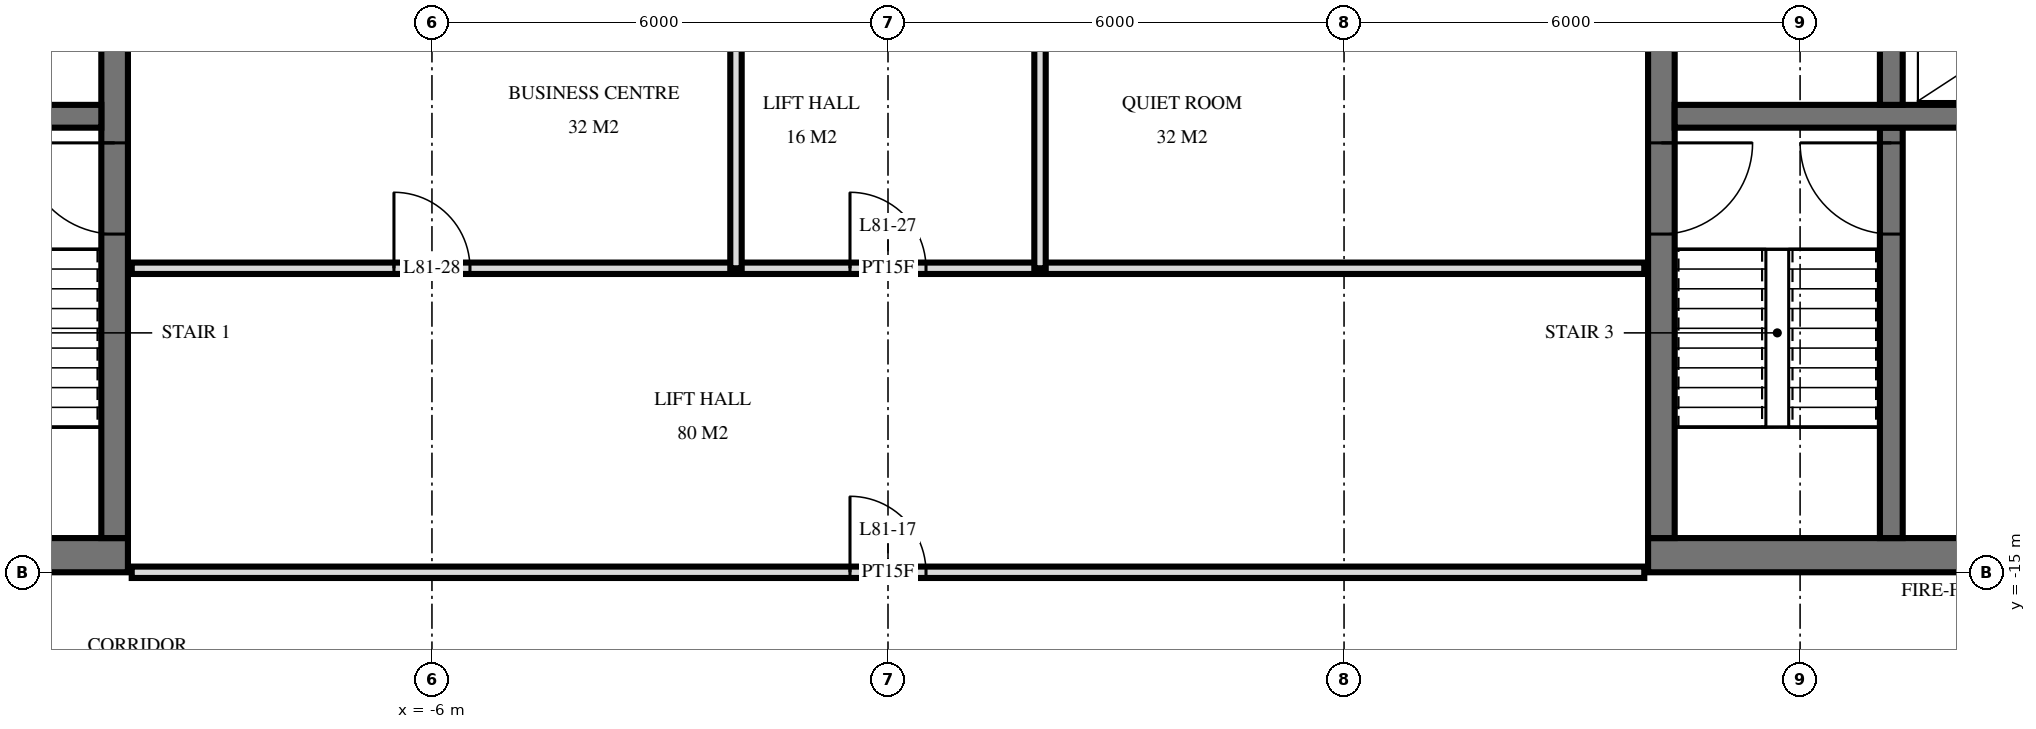
"""IFC4 building model, lengths in metres.
Left out: names, types, materials, properties, quantities, classifications, styles, units other than length and angle.
Written with IfcOpenShell. Run it as: python <this file> out.ifc"""

import sys

from ifc_helpers import new_model, si_unit, direction, frame, frame_2d, origin, place, context, subcontext, project, spatial, rectangle, extrude, element, fill, save


model = new_model("IFC4")
c1 = context("Model", 3, precision=1e-05, world=origin(), true_north=direction((0.0, 1.0)))
c2 = subcontext(c1, "Body", "Model", "MODEL_VIEW")
j1 = project(units=[si_unit("LENGTHUNIT", "METRE"), si_unit("PLANEANGLEUNIT", "RADIAN")], contexts=[c1])
p1 = place(None, origin())
s1 = spatial("IfcSite", under=j1, at=p1, CompositionType="ELEMENT")
p2 = place(p1, origin())
s2 = spatial("IfcBuilding", under=s1, at=p2, CompositionType="ELEMENT")
p3 = place(p2, frame((0.0, 0.0, 305.1)))
s3 = spatial("IfcBuildingStorey", under=s2, at=p3, CompositionType="ELEMENT", Elevation=305.1)
p4 = place(p3, frame((-19.5, -14.775, 0.0), z_axis=(0.0, 0.0, 1.0), x_axis=(1.0, 0.0, 0.0)))
e1 = element("IfcWall", 1, at=p4, inside=s3, PredefinedType="SHEAR", context=c2, shape_type="SweptSolid", body=[
    extrude(rectangle(XDim=9.5, YDim=0.45, at=frame_2d((4.75, 0.0))), origin(), (0.0, 0.0, 1.0), 3.5),
])
p5 = place(p4, frame((1.2, 0.0, 0.0)))
e2 = element("IfcOpeningElement", 2, at=p5, cuts=e1, PredefinedType="OPENING", context=c2, shape_type="SweptSolid", body=[
    extrude(rectangle(XDim=1.2, YDim=2.1, at=frame_2d((0.6, 1.05))), frame((0.0, 0.235, 0.0), z_axis=(0.0, -1.0, 0.0), x_axis=(1.0, 0.0, 0.0)), (0.0, 0.0, 1.0), 0.47),
])
p6 = place(p4, frame((4.25, 0.0, 0.0)))
e3 = element("IfcOpeningElement", 3, at=p6, cuts=e1, PredefinedType="OPENING", context=c2, shape_type="SweptSolid", body=[
    extrude(rectangle(XDim=1.1, YDim=2.1, at=frame_2d((0.55, 1.05))), frame((0.0, 0.235, 0.0), z_axis=(0.0, -1.0, 0.0), x_axis=(1.0, 0.0, 0.0)), (0.0, 0.0, 1.0), 0.47),
])
p7 = place(p3, frame((-10.175, -14.55, 0.0), z_axis=(0.0, 0.0, 1.0), x_axis=(0.0, 1.0, 0.0)))
e4 = element("IfcWall", 4, at=p7, inside=s3, PredefinedType="SHEAR", context=c2, shape_type="SweptSolid", body=[
    extrude(rectangle(XDim=14.1, YDim=0.35, at=frame_2d((7.05, 0.0))), origin(), (0.0, 0.0, 1.0), 3.5),
])
p8 = place(p7, frame((8.4, 0.0, 0.0)))
e5 = element("IfcOpeningElement", 5, at=p8, cuts=e4, PredefinedType="OPENING", context=c2, shape_type="SweptSolid", body=[
    extrude(rectangle(XDim=1.4, YDim=2.4, at=frame_2d((0.7, 1.2))), frame((0.0, 0.185, 0.0), z_axis=(0.0, -1.0, 0.0), x_axis=(1.0, 0.0, 0.0)), (0.0, 0.0, 1.0), 0.37),
])
p9 = place(p7, frame((10.0, 0.0, 0.0)))
e6 = element("IfcOpeningElement", 6, at=p9, cuts=e4, PredefinedType="OPENING", context=c2, shape_type="SweptSolid", body=[
    extrude(rectangle(XDim=1.4, YDim=2.4, at=frame_2d((0.7, 1.2))), frame((0.0, 0.185, 0.0), z_axis=(0.0, -1.0, 0.0), x_axis=(1.0, 0.0, 0.0)), (0.0, 0.0, 1.0), 0.37),
])
p10 = place(p7, frame((4.0, 0.0, 0.0)))
e7 = element("IfcOpeningElement", 7, at=p10, cuts=e4, PredefinedType="OPENING", context=c2, shape_type="SweptSolid", body=[
    extrude(rectangle(XDim=1.2, YDim=2.1, at=frame_2d((0.6, 1.05))), frame((0.0, 0.185, 0.0), z_axis=(0.0, -1.0, 0.0), x_axis=(1.0, 0.0, 0.0)), (0.0, 0.0, 1.0), 0.37),
])
p11 = place(p3, frame((-19.05, -9.0, 0.0), z_axis=(0.0, 0.0, 1.0), x_axis=(1.0, 0.0, 0.0)))
e8 = element("IfcWall", 8, at=p11, inside=s3, PredefinedType="SHEAR", context=c2, shape_type="SweptSolid", body=[
    extrude(rectangle(XDim=8.7, YDim=0.3, at=frame_2d((4.35, 0.0))), origin(), (0.0, 0.0, 1.0), 3.5),
])
p12 = place(p11, frame((3.8, 0.0, 0.0)))
e9 = element("IfcOpeningElement", 9, at=p12, cuts=e8, PredefinedType="OPENING", context=c2, shape_type="SweptSolid", body=[
    extrude(rectangle(XDim=1.1, YDim=2.1, at=frame_2d((0.55, 1.05))), frame((0.0, 0.16, 0.0), z_axis=(0.0, -1.0, 0.0), x_axis=(1.0, 0.0, 0.0)), (0.0, 0.0, 1.0), 0.32),
])
p13 = place(p3, frame((10.0, -14.775, 0.0), z_axis=(0.0, 0.0, 1.0), x_axis=(1.0, 0.0, 0.0)))
e10 = element("IfcWall", 10, at=p13, inside=s3, PredefinedType="SHEAR", context=c2, shape_type="SweptSolid", body=[
    extrude(rectangle(XDim=9.5, YDim=0.45, at=frame_2d((4.75, 0.0))), origin(), (0.0, 0.0, 1.0), 3.5),
])
p14 = place(p13, frame((7.1, 0.0, 0.0)))
e11 = element("IfcOpeningElement", 11, at=p14, cuts=e10, PredefinedType="OPENING", context=c2, shape_type="SweptSolid", body=[
    extrude(rectangle(XDim=1.2, YDim=2.1, at=frame_2d((0.6, 1.05))), frame((0.0, 0.235, 0.0), z_axis=(0.0, -1.0, 0.0), x_axis=(1.0, 0.0, 0.0)), (0.0, 0.0, 1.0), 0.47),
])
p15 = place(p13, frame((4.15, 0.0, 0.0)))
e12 = element("IfcOpeningElement", 12, at=p15, cuts=e10, PredefinedType="OPENING", context=c2, shape_type="SweptSolid", body=[
    extrude(rectangle(XDim=1.1, YDim=2.1, at=frame_2d((0.55, 1.05))), frame((0.0, 0.235, 0.0), z_axis=(0.0, -1.0, 0.0), x_axis=(1.0, 0.0, 0.0)), (0.0, 0.0, 1.0), 0.47),
])
p16 = place(p3, frame((10.175, -14.55, 0.0), z_axis=(0.0, 0.0, 1.0), x_axis=(0.0, 1.0, 0.0)))
e13 = element("IfcWall", 13, at=p16, inside=s3, PredefinedType="SHEAR", context=c2, shape_type="SweptSolid", body=[
    extrude(rectangle(XDim=14.1, YDim=0.35, at=frame_2d((7.05, 0.0))), origin(), (0.0, 0.0, 1.0), 3.5),
])
p17 = place(p16, frame((8.4, 0.0, 0.0)))
e14 = element("IfcOpeningElement", 14, at=p17, cuts=e13, PredefinedType="OPENING", context=c2, shape_type="SweptSolid", body=[
    extrude(rectangle(XDim=1.4, YDim=2.4, at=frame_2d((0.7, 1.2))), frame((0.0, 0.185, 0.0), z_axis=(0.0, -1.0, 0.0), x_axis=(1.0, 0.0, 0.0)), (0.0, 0.0, 1.0), 0.37),
])
p18 = place(p16, frame((10.0, 0.0, 0.0)))
e15 = element("IfcOpeningElement", 15, at=p18, cuts=e13, PredefinedType="OPENING", context=c2, shape_type="SweptSolid", body=[
    extrude(rectangle(XDim=1.4, YDim=2.4, at=frame_2d((0.7, 1.2))), frame((0.0, 0.185, 0.0), z_axis=(0.0, -1.0, 0.0), x_axis=(1.0, 0.0, 0.0)), (0.0, 0.0, 1.0), 0.37),
])
p19 = place(p16, frame((4.0, 0.0, 0.0)))
e16 = element("IfcOpeningElement", 16, at=p19, cuts=e13, PredefinedType="OPENING", context=c2, shape_type="SweptSolid", body=[
    extrude(rectangle(XDim=1.2, YDim=2.1, at=frame_2d((0.6, 1.05))), frame((0.0, 0.185, 0.0), z_axis=(0.0, -1.0, 0.0), x_axis=(1.0, 0.0, 0.0)), (0.0, 0.0, 1.0), 0.37),
])
p20 = place(p3, frame((10.35, -9.0, 0.0), z_axis=(0.0, 0.0, 1.0), x_axis=(1.0, 0.0, 0.0)))
e17 = element("IfcWall", 17, at=p20, inside=s3, PredefinedType="SHEAR", context=c2, shape_type="SweptSolid", body=[
    extrude(rectangle(XDim=8.7, YDim=0.3, at=frame_2d((4.35, 0.0))), origin(), (0.0, 0.0, 1.0), 3.5),
])
p21 = place(p20, frame((3.8, 0.0, 0.0)))
e18 = element("IfcOpeningElement", 18, at=p21, cuts=e17, PredefinedType="OPENING", context=c2, shape_type="SweptSolid", body=[
    extrude(rectangle(XDim=1.1, YDim=2.1, at=frame_2d((0.55, 1.05))), frame((0.0, 0.16, 0.0), z_axis=(0.0, -1.0, 0.0), x_axis=(1.0, 0.0, 0.0)), (0.0, 0.0, 1.0), 0.32),
])
p22 = place(p3, frame((13.2, -8.85, 0.0), z_axis=(0.0, 0.0, 1.0), x_axis=(0.0, 1.0, 0.0)))
e19 = element("IfcWall", 19, at=p22, inside=s3, PredefinedType="SHEAR", context=c2, shape_type="SweptSolid", body=[
    extrude(rectangle(XDim=2.3, YDim=0.3, at=frame_2d((1.15, 0.0))), origin(), (0.0, 0.0, 1.0), 3.5),
])
p23 = place(p3, frame((13.2, -14.55, 0.0), z_axis=(0.0, 0.0, 1.0), x_axis=(0.0, 1.0, 0.0)))
e20 = element("IfcWall", 20, at=p23, inside=s3, PredefinedType="SHEAR", context=c2, shape_type="SweptSolid", body=[
    extrude(rectangle(XDim=5.4, YDim=0.3, at=frame_2d((2.7, 0.0))), origin(), (0.0, 0.0, 1.0), 3.5),
])
p24 = place(p23, frame((4.0, 0.0, 0.0)))
e21 = element("IfcOpeningElement", 21, at=p24, cuts=e20, PredefinedType="OPENING", context=c2, shape_type="SweptSolid", body=[
    extrude(rectangle(XDim=1.2, YDim=2.1, at=frame_2d((0.6, 1.05))), frame((0.0, 0.16, 0.0), z_axis=(0.0, -1.0, 0.0), x_axis=(1.0, 0.0, 0.0)), (0.0, 0.0, 1.0), 0.32),
])
for number, where, z_axis, x_axis in (
    (22, (2.0, -11.0, 0.0), (0.0, 0.0, 1.0), (0.0, 1.0, 0.0)),
    (23, (-2.0, -11.0, 0.0), (0.0, 0.0, 1.0), (0.0, 1.0, 0.0)),
):
    element("IfcWall", number, at=place(p3, frame(where, z_axis=z_axis, x_axis=x_axis)), inside=s3, PredefinedType="PARTITIONING", context=c2, shape_type="SweptSolid", body=[
        extrude(rectangle(XDim=4.0, YDim=0.15, at=frame_2d((2.0, 0.0))), origin(), (0.0, 0.0, 1.0), 3.22),
    ])
p25 = place(p3, frame((-9.95, -15.0, 0.0), z_axis=(0.0, 0.0, 1.0), x_axis=(1.0, 0.0, 0.0)))
e24 = element("IfcWall", 24, at=p25, inside=s3, PredefinedType="PARTITIONING", context=c2, shape_type="SweptSolid", body=[
    extrude(rectangle(XDim=19.9, YDim=0.15, at=frame_2d((9.95, 0.0))), origin(), (0.0, 0.0, 1.0), 3.22),
])
p26 = place(p25, frame((9.45, 0.0, 0.0)))
e25 = element("IfcOpeningElement", 25, at=p26, cuts=e24, PredefinedType="OPENING", context=c2, shape_type="SweptSolid", body=[
    extrude(rectangle(XDim=1.0, YDim=2.1, at=frame_2d((0.5, 1.05))), frame((0.0, 0.085, 0.0), z_axis=(0.0, -1.0, 0.0), x_axis=(1.0, 0.0, 0.0)), (0.0, 0.0, 1.0), 0.17),
])
p27 = place(p3, frame((-9.95, -11.0, 0.0), z_axis=(0.0, 0.0, 1.0), x_axis=(1.0, 0.0, 0.0)))
e26 = element("IfcWall", 26, at=p27, inside=s3, PredefinedType="PARTITIONING", context=c2, shape_type="SweptSolid", body=[
    extrude(rectangle(XDim=19.9, YDim=0.15, at=frame_2d((9.95, 0.0))), origin(), (0.0, 0.0, 1.0), 3.22),
])
p28 = place(p27, frame((9.45, 0.0, 0.0)))
e27 = element("IfcOpeningElement", 27, at=p28, cuts=e26, PredefinedType="OPENING", context=c2, shape_type="SweptSolid", body=[
    extrude(rectangle(XDim=1.0, YDim=2.1, at=frame_2d((0.5, 1.05))), frame((0.0, 0.085, 0.0), z_axis=(0.0, -1.0, 0.0), x_axis=(1.0, 0.0, 0.0)), (0.0, 0.0, 1.0), 0.17),
])
p29 = place(p27, frame((3.45, 0.0, 0.0)))
e28 = element("IfcOpeningElement", 28, at=p29, cuts=e26, PredefinedType="OPENING", context=c2, shape_type="SweptSolid", body=[
    extrude(rectangle(XDim=1.0, YDim=2.1, at=frame_2d((0.5, 1.05))), frame((0.0, 0.085, 0.0), z_axis=(0.0, -1.0, 0.0), x_axis=(1.0, 0.0, 0.0)), (0.0, 0.0, 1.0), 0.17),
])
p30 = place(p10, origin())
e29 = element("IfcDoor", 29, at=p30, inside=s3, OperationType="SINGLE_SWING_LEFT", PredefinedType="DOOR", context=c2, shape_type="SweptSolid", body=[
    extrude(rectangle(XDim=1.2, YDim=2.1, at=frame_2d((0.6, 1.05))), frame((0.0, 0.025, 0.0), z_axis=(0.0, -1.0, 0.0), x_axis=(1.0, 0.0, 0.0)), (0.0, 0.0, 1.0), 0.05),
])
fill(e7, e29)
p31 = place(p19, frame((0.6, 0.0, 0.0), z_axis=(0.0, 0.0, 1.0), x_axis=(-1.0, 0.0, 0.0)))
e30 = element("IfcDoor", 30, at=p31, inside=s3, OperationType="SINGLE_SWING_RIGHT", PredefinedType="DOOR", context=c2, shape_type="SweptSolid", body=[
    extrude(rectangle(XDim=1.2, YDim=2.1, at=frame_2d((0.0, 1.05))), frame((0.0, -0.025, 0.0), z_axis=(0.0, 1.0, 0.0), x_axis=(-1.0, 0.0, 0.0)), (0.0, 0.0, 1.0), 0.05),
])
fill(e16, e30)
p32 = place(p24, origin())
e31 = element("IfcDoor", 31, at=p32, inside=s3, OperationType="SINGLE_SWING_LEFT", PredefinedType="DOOR", context=c2, shape_type="SweptSolid", body=[
    extrude(rectangle(XDim=1.2, YDim=2.1, at=frame_2d((0.6, 1.05))), frame((0.0, 0.025, 0.0), z_axis=(0.0, -1.0, 0.0), x_axis=(1.0, 0.0, 0.0)), (0.0, 0.0, 1.0), 0.05),
])
fill(e21, e31)
p33 = place(p26, origin())
e32 = element("IfcDoor", 32, at=p33, inside=s3, OperationType="SINGLE_SWING_RIGHT", PredefinedType="DOOR", context=c2, shape_type="SweptSolid", body=[
    extrude(rectangle(XDim=1.0, YDim=2.1, at=frame_2d((0.5, 1.05))), frame((0.0, 0.025, 0.0), z_axis=(0.0, -1.0, 0.0), x_axis=(1.0, 0.0, 0.0)), (0.0, 0.0, 1.0), 0.05),
])
fill(e25, e32)
p34 = place(p28, origin())
e33 = element("IfcDoor", 33, at=p34, inside=s3, OperationType="SINGLE_SWING_RIGHT", PredefinedType="DOOR", context=c2, shape_type="SweptSolid", body=[
    extrude(rectangle(XDim=1.0, YDim=2.1, at=frame_2d((0.5, 1.05))), frame((0.0, 0.025, 0.0), z_axis=(0.0, -1.0, 0.0), x_axis=(1.0, 0.0, 0.0)), (0.0, 0.0, 1.0), 0.05),
])
fill(e27, e33)
p35 = place(p29, origin())
e34 = element("IfcDoor", 34, at=p35, inside=s3, OperationType="SINGLE_SWING_RIGHT", PredefinedType="DOOR", context=c2, shape_type="SweptSolid", body=[
    extrude(rectangle(XDim=1.0, YDim=2.1, at=frame_2d((0.5, 1.05))), frame((0.0, 0.025, 0.0), z_axis=(0.0, -1.0, 0.0), x_axis=(1.0, 0.0, 0.0)), (0.0, 0.0, 1.0), 0.05),
])
fill(e28, e34)
save(model, sys.argv[1])
